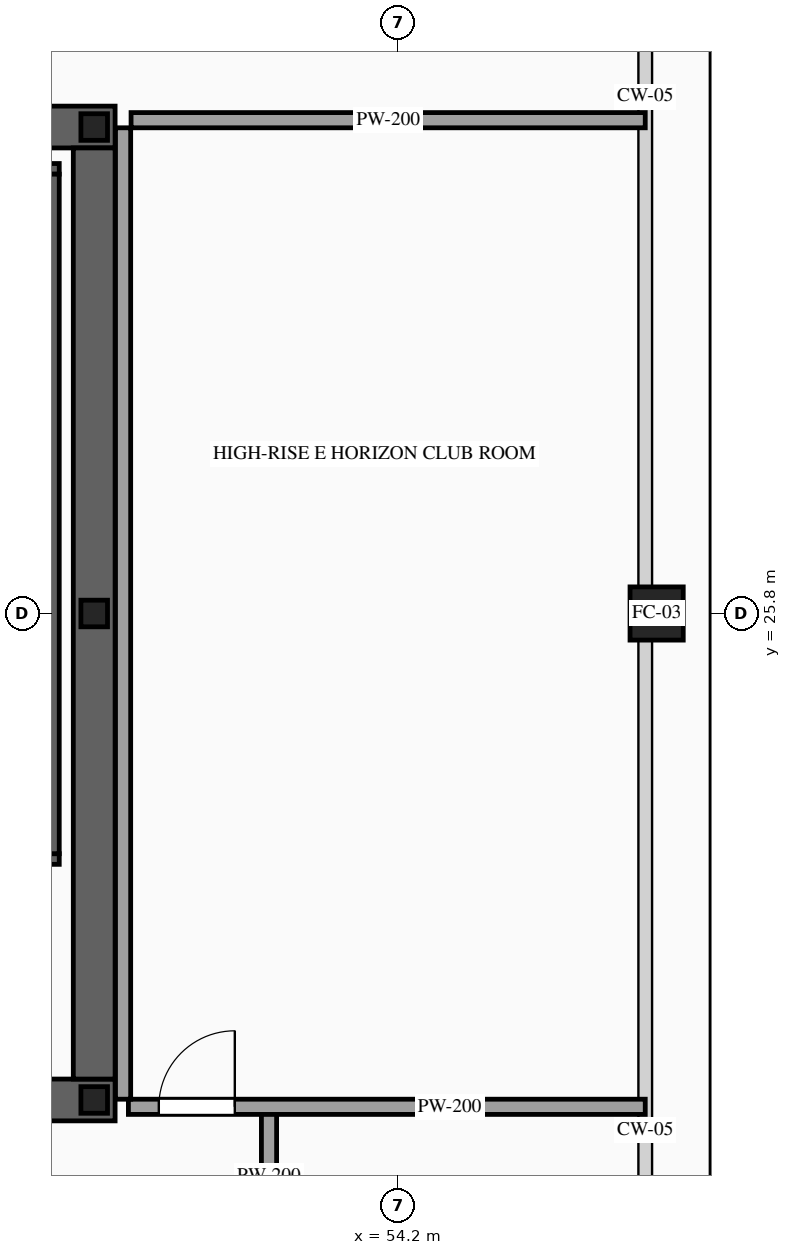
"""IFC4 building model, lengths in metres.
Left out: names, types, materials, properties, quantities, classifications, styles, units other than length and angle.
Written with IfcOpenShell. Run it as: python <this file> out.ifc"""

import sys

from ifc_helpers import new_model, si_unit, direction, frame, frame_2d, origin, origin_2d, place, context, subcontext, project, spatial, rectangle, hollow_rectangle, i_section, extrude, source, transform, mapped, element, fill, save


model = new_model("IFC4")
c1 = context("Model", 3, precision=1e-05, world=origin(), true_north=direction((0.0, 1.0)))
c2 = subcontext(c1, "Body", "Model", "MODEL_VIEW")
j1 = project(units=[si_unit("LENGTHUNIT", "METRE"), si_unit("PLANEANGLEUNIT", "RADIAN")], contexts=[c1])
p1 = place(None, origin())
s1 = spatial("IfcSite", under=j1, at=p1, CompositionType="ELEMENT")
p2 = place(p1, origin())
s2 = spatial("IfcBuilding", under=s1, at=p2, CompositionType="ELEMENT")
p3 = place(p2, frame((0.0, 0.0, 275.1)))
s3 = spatial("IfcBuildingStorey", under=s2, at=p3, CompositionType="ELEMENT", Elevation=275.1)
p4 = place(p3, frame((23.525, 19.4, 0.0), z_axis=(0.0, 0.0, 1.0), x_axis=(1.0, 0.0, 0.0)))
e1 = element("IfcWall", 1, at=p4, inside=s3, PredefinedType="SHEAR", context=c2, shape_type="SweptSolid", body=[
    extrude(rectangle(XDim=26.95, YDim=0.55, at=frame_2d((13.475, 0.0))), origin(), (0.0, 0.0, 1.0), 3.5),
])
p5 = place(p4, frame((1.925, 0.0, 0.0)))
e2 = element("IfcOpeningElement", 2, at=p5, cuts=e1, PredefinedType="OPENING", context=c2, shape_type="SweptSolid", body=[
    extrude(rectangle(XDim=1.1, YDim=2.2, at=frame_2d((0.55, 1.1))), frame((0.0, 0.29, 0.0), z_axis=(0.0, -1.0, 0.0), x_axis=(1.0, 0.0, 0.0)), (0.0, 0.0, 1.0), 0.58),
])
p6 = place(p4, frame((9.825, 0.0, 0.0)))
e3 = element("IfcOpeningElement", 3, at=p6, cuts=e1, PredefinedType="OPENING", context=c2, shape_type="SweptSolid", body=[
    extrude(rectangle(XDim=1.1, YDim=2.2, at=frame_2d((0.55, 1.1))), frame((0.0, 0.29, 0.0), z_axis=(0.0, -1.0, 0.0), x_axis=(1.0, 0.0, 0.0)), (0.0, 0.0, 1.0), 0.58),
])
p7 = place(p4, frame((23.025, 0.0, 0.0)))
e4 = element("IfcOpeningElement", 4, at=p7, cuts=e1, PredefinedType="OPENING", context=c2, shape_type="SweptSolid", body=[
    extrude(rectangle(XDim=1.1, YDim=2.2, at=frame_2d((0.55, 1.1))), frame((0.0, 0.29, 0.0), z_axis=(0.0, -1.0, 0.0), x_axis=(1.0, 0.0, 0.0)), (0.0, 0.0, 1.0), 0.58),
])
p8 = place(p4, frame((19.645, 0.0, 0.0)))
e5 = element("IfcOpeningElement", 5, at=p8, cuts=e1, PredefinedType="OPENING", context=c2, shape_type="SweptSolid", body=[
    extrude(rectangle(XDim=0.9, YDim=2.15, at=frame_2d((0.45, 1.075))), frame((0.0, 0.29, 0.0), z_axis=(0.0, -1.0, 0.0), x_axis=(1.0, 0.0, 0.0)), (0.0, 0.0, 1.0), 0.58),
])
p9 = place(p4, frame((18.205, 0.0, 0.0)))
e6 = element("IfcOpeningElement", 6, at=p9, cuts=e1, PredefinedType="OPENING", context=c2, shape_type="SweptSolid", body=[
    extrude(rectangle(XDim=0.9, YDim=2.15, at=frame_2d((0.45, 1.075))), frame((0.0, 0.29, 0.0), z_axis=(0.0, -1.0, 0.0), x_axis=(1.0, 0.0, 0.0)), (0.0, 0.0, 1.0), 0.58),
])
p10 = place(p3, frame((23.525, 32.2, 0.0), z_axis=(0.0, 0.0, 1.0), x_axis=(1.0, 0.0, 0.0)))
e7 = element("IfcWall", 7, at=p10, inside=s3, PredefinedType="SHEAR", context=c2, shape_type="SweptSolid", body=[
    extrude(rectangle(XDim=26.95, YDim=0.55, at=frame_2d((13.475, 0.0))), origin(), (0.0, 0.0, 1.0), 3.5),
])
p11 = place(p10, frame((4.545, 0.0, 0.0)))
e8 = element("IfcOpeningElement", 8, at=p11, cuts=e7, PredefinedType="OPENING", context=c2, shape_type="SweptSolid", body=[
    extrude(rectangle(XDim=0.9, YDim=2.15, at=frame_2d((0.45, 1.075))), frame((0.0, 0.29, 0.0), z_axis=(0.0, -1.0, 0.0), x_axis=(1.0, 0.0, 0.0)), (0.0, 0.0, 1.0), 0.58),
])
p12 = place(p10, frame((9.825, 0.0, 0.0)))
e9 = element("IfcOpeningElement", 9, at=p12, cuts=e7, PredefinedType="OPENING", context=c2, shape_type="SweptSolid", body=[
    extrude(rectangle(XDim=1.1, YDim=2.2, at=frame_2d((0.55, 1.1))), frame((0.0, 0.29, 0.0), z_axis=(0.0, -1.0, 0.0), x_axis=(1.0, 0.0, 0.0)), (0.0, 0.0, 1.0), 0.58),
])
p13 = place(p10, frame((15.675, 0.0, 0.0)))
e10 = element("IfcOpeningElement", 10, at=p13, cuts=e7, PredefinedType="OPENING", context=c2, shape_type="SweptSolid", body=[
    extrude(rectangle(XDim=1.1, YDim=2.2, at=frame_2d((0.55, 1.1))), frame((0.0, 0.29, 0.0), z_axis=(0.0, -1.0, 0.0), x_axis=(1.0, 0.0, 0.0)), (0.0, 0.0, 1.0), 0.58),
])
p14 = place(p10, frame((18.775, 0.0, 0.0)))
e11 = element("IfcOpeningElement", 11, at=p14, cuts=e7, PredefinedType="OPENING", context=c2, shape_type="SweptSolid", body=[
    extrude(rectangle(XDim=1.1, YDim=2.2, at=frame_2d((0.55, 1.1))), frame((0.0, 0.29, 0.0), z_axis=(0.0, -1.0, 0.0), x_axis=(1.0, 0.0, 0.0)), (0.0, 0.0, 1.0), 0.58),
])
m1 = source(origin(), c2, "Body", "SweptSolid", [
    extrude(rectangle(XDim=12.25, YDim=0.55, at=frame_2d((6.125, 0.0))), origin(), (0.0, 0.0, 1.0), 3.5),
])
p15 = place(p3, frame((50.2, 19.675, 0.0), z_axis=(0.0, 0.0, 1.0), x_axis=(0.0, 1.0, 0.0)))
e12 = element("IfcWall", 12, at=p15, inside=s3, PredefinedType="SHEAR", context=c2, shape_type="MappedRepresentation", body=[
    mapped(m1, transform((0.0, 0.0, 0.0), scale=1.0)),
])
m2 = source(origin(), c2, "Body", "SweptSolid", [
    extrude(i_section(OverallWidth=0.35, OverallDepth=0.35, WebThickness=0.012, FlangeThickness=0.019, at=origin_2d()), origin(), (0.0, 0.0, 1.0), 3.5),
])
for number, where, z_axis, x_axis in (
    (13, (50.2, 19.4, 0.0), (0.0, 0.0, 1.0), (1.0, 0.0, 0.0)),
    (14, (50.2, 25.8, 0.0), (0.0, 0.0, 1.0), (1.0, 0.0, 0.0)),
    (15, (50.2, 32.2, 0.0), (0.0, 0.0, 1.0), (1.0, 0.0, 0.0)),
):
    element("IfcColumn", number, at=place(p3, frame(where, z_axis=z_axis, x_axis=x_axis)), inside=s3, PredefinedType="COLUMN", context=c2, shape_type="MappedRepresentation", body=[
        mapped(m2, transform((0.0, 0.0, 0.0), scale=1.0)),
    ])
m3 = source(origin(), c2, "Body", "SweptSolid", [
    extrude(hollow_rectangle(XDim=0.7, YDim=0.7, WallThickness=0.032, at=origin_2d()), origin(), (0.0, 0.0, 1.0), 3.5),
])
p16 = place(p3, frame((57.6, 25.8, 0.0), z_axis=(0.0, 0.0, 1.0), x_axis=(1.0, 0.0, 0.0)))
e16 = element("IfcColumn", 16, at=p16, inside=s3, PredefinedType="COLUMN", context=c2, shape_type="MappedRepresentation", body=[
    mapped(m3, transform((0.0, 0.0, 0.0), scale=1.0)),
])
p17 = place(p3, frame((46.46, 22.57, 0.0), z_axis=(0.0, 0.0, 1.0), x_axis=(1.0, 0.0, 0.0)))
e17 = element("IfcWall", 17, at=p17, inside=s3, PredefinedType="SOLIDWALL", context=c2, shape_type="SweptSolid", body=[
    extrude(rectangle(XDim=3.28, YDim=0.14, at=frame_2d((1.64, 0.0))), origin(), (0.0, 0.0, 1.0), 3.28),
])
p18 = place(p17, frame((1.09, 0.0, 0.0)))
e18 = element("IfcOpeningElement", 18, at=p18, cuts=e17, PredefinedType="OPENING", context=c2, shape_type="SweptSolid", body=[
    extrude(rectangle(XDim=1.1, YDim=2.2, at=frame_2d((0.55, 1.1))), frame((0.0, 0.085, 0.0), z_axis=(0.0, -1.0, 0.0), x_axis=(1.0, 0.0, 0.0)), (0.0, 0.0, 1.0), 0.17),
])
m4 = source(origin(), c2, "Body", "SweptSolid", [
    extrude(rectangle(XDim=3.28, YDim=0.14, at=frame_2d((1.64, 0.0))), origin(), (0.0, 0.0, 1.0), 3.28),
])
p19 = place(p3, frame((46.46, 31.65, 0.0), z_axis=(0.0, 0.0, 1.0), x_axis=(1.0, 0.0, 0.0)))
e19 = element("IfcWall", 19, at=p19, inside=s3, PredefinedType="SOLIDWALL", context=c2, shape_type="MappedRepresentation", body=[
    mapped(m4, transform((0.0, 0.0, 0.0), scale=1.0)),
])
m5 = source(origin(), c2, "Body", "SweptSolid", [
    extrude(rectangle(XDim=8.94, YDim=0.14, at=frame_2d((4.47, 0.0))), origin(), (0.0, 0.0, 1.0), 3.28),
])
p20 = place(p3, frame((49.67, 22.64, 0.0), z_axis=(0.0, 0.0, 1.0), x_axis=(0.0, 1.0, 0.0)))
e20 = element("IfcWall", 20, at=p20, inside=s3, PredefinedType="SOLIDWALL", context=c2, shape_type="MappedRepresentation", body=[
    mapped(m5, transform((0.0, 0.0, 0.0), scale=1.0)),
])
m6 = source(origin(), c2, "Body", "SweptSolid", [
    extrude(rectangle(XDim=1.7, YDim=0.2, at=frame_2d((0.85, 0.0))), origin(), (0.0, 0.0, 1.0), 3.28),
])
p21 = place(p3, frame((52.5, 17.55, 0.0), z_axis=(0.0, 0.0, 1.0), x_axis=(0.0, 1.0, 0.0)))
e21 = element("IfcWall", 21, at=p21, inside=s3, PredefinedType="PARTITIONING", context=c2, shape_type="MappedRepresentation", body=[
    mapped(m6, transform((0.0, 0.0, 0.0), scale=1.0)),
])
p22 = place(p3, frame((50.65, 19.31, 0.0), z_axis=(0.0, 0.0, 1.0), x_axis=(1.0, 0.0, 0.0)))
e22 = element("IfcWall", 22, at=p22, inside=s3, PredefinedType="PARTITIONING", context=c2, shape_type="SweptSolid", body=[
    extrude(rectangle(XDim=6.8, YDim=0.2, at=frame_2d((3.4, 0.0))), origin(), (0.0, 0.0, 1.0), 2.825),
])
p23 = place(p22, frame((0.4, 0.0, 0.0)))
e23 = element("IfcOpeningElement", 23, at=p23, cuts=e22, PredefinedType="OPENING", context=c2, shape_type="SweptSolid", body=[
    extrude(rectangle(XDim=1.0, YDim=2.2, at=frame_2d((0.5, 1.1))), frame((0.0, 0.115, 0.0), z_axis=(0.0, -1.0, 0.0), x_axis=(1.0, 0.0, 0.0)), (0.0, 0.0, 1.0), 0.23),
])
m7 = source(origin(), c2, "Body", "SweptSolid", [
    extrude(rectangle(XDim=6.765, YDim=0.2, at=frame_2d((3.382, 0.0))), origin(), (0.0, 0.0, 1.0), 2.825),
])
p24 = place(p3, frame((50.685, 32.29, 0.0), z_axis=(0.0, 0.0, 1.0), x_axis=(1.0, 0.0, 0.0)))
e24 = element("IfcWall", 24, at=p24, inside=s3, PredefinedType="PARTITIONING", context=c2, shape_type="MappedRepresentation", body=[
    mapped(m7, transform((0.0, 0.0, 0.0), scale=1.0)),
])
m8 = source(origin(), c2, "Body", "SweptSolid", [
    extrude(rectangle(XDim=12.78, YDim=0.2, at=frame_2d((6.39, 0.0))), origin(), (0.0, 0.0, 1.0), 3.28),
])
p25 = place(p3, frame((50.58, 19.41, 0.0), z_axis=(0.0, 0.0, 1.0), x_axis=(0.0, 1.0, 0.0)))
e25 = element("IfcWall", 25, at=p25, inside=s3, PredefinedType="PARTITIONING", context=c2, shape_type="MappedRepresentation", body=[
    mapped(m8, transform((0.0, 0.0, 0.0), scale=1.0)),
])
m9 = source(origin(), c2, "Body", "SweptSolid", [
    extrude(rectangle(XDim=1.0, YDim=2.2, at=frame_2d((0.5, 1.1))), frame((0.0, 0.025, 0.0), z_axis=(0.0, -1.0, 0.0), x_axis=(1.0, 0.0, 0.0)), (0.0, 0.0, 1.0), 0.05),
])
p26 = place(p23, origin())
e26 = element("IfcDoor", 26, at=p26, inside=s3, OperationType="SINGLE_SWING_RIGHT", PredefinedType="DOOR", context=c2, shape_type="MappedRepresentation", body=[
    mapped(m9, transform((0.0, 0.0, 0.0), scale=1.0)),
])
fill(e23, e26)
save(model, sys.argv[1])
